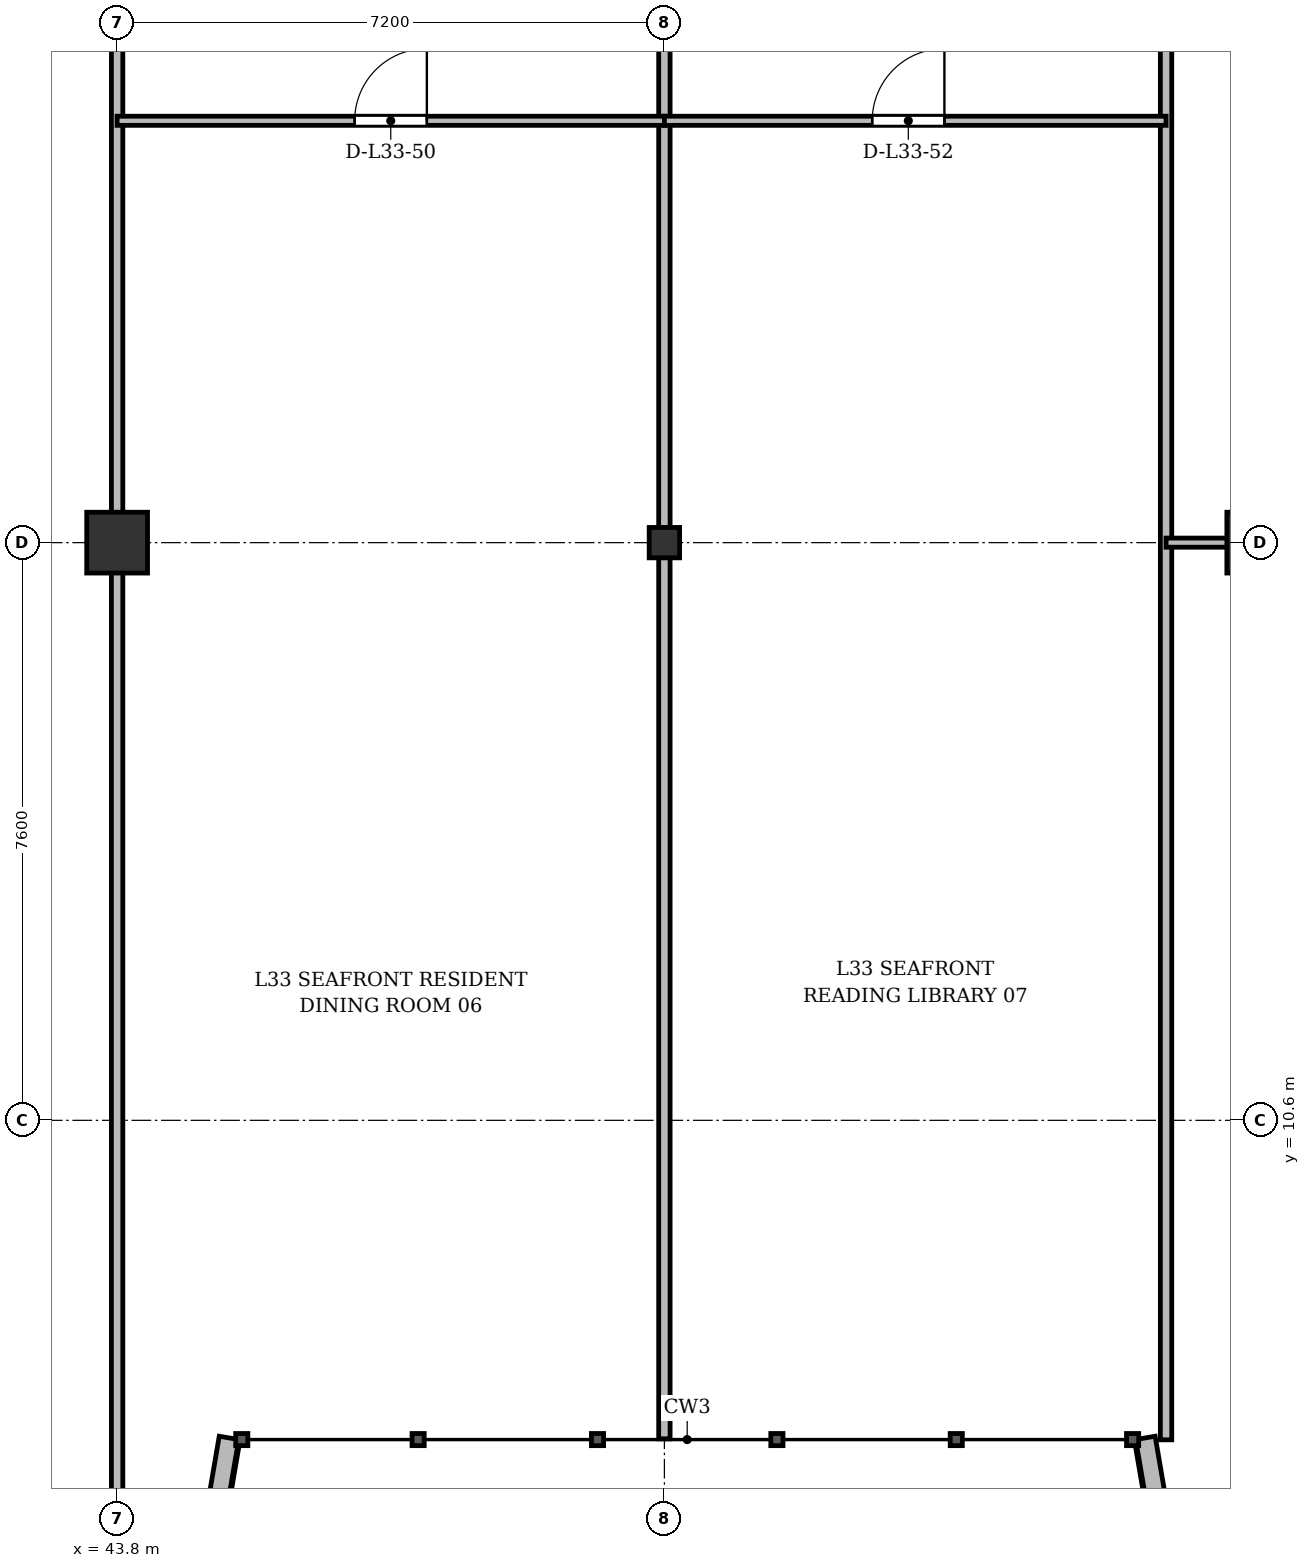
"""IFC4 building model, lengths in metres.
Left out: names, types, materials, properties, quantities, classifications, styles, units other than length and angle.
Written with IfcOpenShell. Run it as: python <this file> out.ifc"""

import sys

from ifc_helpers import new_model, si_unit, direction, frame, frame_2d, origin, origin_2d, place, context, subcontext, project, spatial, rectangle, i_section, extrude, source, transform, mapped, element, fill, save


model = new_model("IFC4")
c1 = context("Model", 3, precision=1e-05, world=origin(), true_north=direction((0.0, 1.0)))
c2 = subcontext(c1, "Body", "Model", "MODEL_VIEW")
j1 = project(units=[si_unit("LENGTHUNIT", "METRE"), si_unit("PLANEANGLEUNIT", "RADIAN")], contexts=[c1])
p1 = place(None, origin())
s1 = spatial("IfcSite", under=j1, at=p1, CompositionType="ELEMENT")
p2 = place(p1, origin())
s2 = spatial("IfcBuilding", under=s1, at=p2, CompositionType="ELEMENT")
p3 = place(p2, frame((0.0, 0.0, 128.5)))
s3 = spatial("IfcBuildingStorey", under=s2, at=p3, CompositionType="ELEMENT", Elevation=128.5)
m1 = source(origin(), c2, "Body", "SweptSolid", [
    extrude(rectangle(XDim=0.8, YDim=0.8, at=origin_2d()), origin(), (0.0, 0.0, 1.0), 3.6),
])
p4 = place(p3, frame((43.8, 18.2, 0.0), z_axis=(0.0, 0.0, 1.0), x_axis=(1.0, 0.0, 0.0)))
e1 = element("IfcColumn", 1, at=p4, inside=s3, PredefinedType="COLUMN", context=c2, shape_type="MappedRepresentation", body=[
    mapped(m1, transform((0.0, 0.0, 0.0), x_axis=(1.0, 0.0, 0.0), y_axis=(0.0, 1.0, 0.0), z_axis=(0.0, 0.0, 1.0), scale=1.0)),
])
m2 = source(origin(), c2, "Body", "SweptSolid", [
    extrude(i_section(OverallWidth=0.4, OverallDepth=0.4, WebThickness=0.022, FlangeThickness=0.035, at=origin_2d()), origin(), (0.0, 0.0, 1.0), 3.6),
])
p5 = place(p3, frame((51.0, 18.2, 0.0), z_axis=(0.0, 0.0, 1.0), x_axis=(1.0, 0.0, 0.0)))
e2 = element("IfcColumn", 2, at=p5, inside=s3, PredefinedType="COLUMN", context=c2, shape_type="MappedRepresentation", body=[
    mapped(m2, transform((0.0, 0.0, 0.0), x_axis=(1.0, 0.0, 0.0), y_axis=(0.0, 1.0, 0.0), z_axis=(0.0, 0.0, 1.0), scale=1.0)),
])
p6 = place(p3, frame((58.8, 18.2, 0.0), z_axis=(0.0, 0.0, 1.0), x_axis=(1.0, 0.0, 0.0)))
e3 = element("IfcColumn", 3, at=p6, inside=s3, PredefinedType="COLUMN", context=c2, shape_type="MappedRepresentation", body=[
    mapped(m1, transform((0.0, 0.0, 0.0), x_axis=(1.0, 0.0, 0.0), y_axis=(0.0, 1.0, 0.0), z_axis=(0.0, 0.0, 1.0), scale=1.0)),
])
for number, where, z_axis, x_axis in (
    (4, (57.928, 2.922, 0.0), (0.0, 0.0, 1.0), (-0.169, 0.986, 0.0)),
    (5, (45.272, 6.422, 0.0), (0.0, 0.0, 1.0), (-0.169, -0.986, 0.0)),
):
    element("IfcWall", number, at=place(p3, frame(where, z_axis=z_axis, x_axis=x_axis)), inside=s3, PredefinedType="SOLIDWALL", context=c2, shape_type="SweptSolid", body=[
        extrude(rectangle(XDim=3.551, YDim=0.26, at=frame_2d((1.775, 0.0))), origin(), (0.0, 0.0, 1.0), 2.632),
    ])
p7 = place(p3, frame((43.8, 3.145, 0.0), z_axis=(0.0, 0.0, 1.0), x_axis=(0.0, 1.0, 0.0)))
e6 = element("IfcWall", 6, at=p7, inside=s3, PredefinedType="PARTITIONING", context=c2, shape_type="SweptSolid", body=[
    extrude(rectangle(XDim=24.455, YDim=0.15, at=frame_2d((12.228, 0.0))), origin(), (0.0, 0.0, 1.0), 2.72),
])
p8 = place(p3, frame((51.0, 6.41, 0.0), z_axis=(0.0, 0.0, 1.0), x_axis=(0.0, 1.0, 0.0)))
e7 = element("IfcWall", 7, at=p8, inside=s3, PredefinedType="PARTITIONING", context=c2, shape_type="SweptSolid", body=[
    extrude(rectangle(XDim=21.19, YDim=0.15, at=frame_2d((10.595, 0.0))), origin(), (0.0, 0.0, 1.0), 2.72),
])
p9 = place(p3, frame((57.6, 6.397, 0.0), z_axis=(0.0, 0.0, 1.0), x_axis=(0.0, 1.0, 0.0)))
e8 = element("IfcWall", 8, at=p9, inside=s3, PredefinedType="PARTITIONING", context=c2, shape_type="SweptSolid", body=[
    extrude(rectangle(XDim=21.203, YDim=0.15, at=frame_2d((10.602, 0.0))), origin(), (0.0, 0.0, 1.0), 2.632),
])
p10 = place(p3, frame((43.8, 23.75, 0.0), z_axis=(0.0, 0.0, 1.0), x_axis=(1.0, 0.0, 0.0)))
e9 = element("IfcWall", 9, at=p10, inside=s3, PredefinedType="PARTITIONING", context=c2, shape_type="SweptSolid", body=[
    extrude(rectangle(XDim=7.2, YDim=0.12, at=frame_2d((3.6, 0.0))), origin(), (0.0, 0.0, 1.0), 2.72),
])
p11 = place(p10, frame((3.125, 0.0, 0.0)))
e10 = element("IfcOpeningElement", 10, at=p11, cuts=e9, PredefinedType="OPENING", context=c2, shape_type="SweptSolid", body=[
    extrude(rectangle(XDim=0.95, YDim=2.15, at=frame_2d((0.475, 1.075))), frame((0.0, 0.07, 0.0), z_axis=(0.0, -1.0, 0.0), x_axis=(1.0, 0.0, 0.0)), (0.0, 0.0, 1.0), 0.14),
])
p12 = place(p3, frame((51.0, 23.75, 0.0), z_axis=(0.0, 0.0, 1.0), x_axis=(1.0, 0.0, 0.0)))
e11 = element("IfcWall", 11, at=p12, inside=s3, PredefinedType="PARTITIONING", context=c2, shape_type="SweptSolid", body=[
    extrude(rectangle(XDim=6.6, YDim=0.12, at=frame_2d((3.3, 0.0))), origin(), (0.0, 0.0, 1.0), 2.72),
])
p13 = place(p12, frame((2.734, 0.0, 0.0)))
e12 = element("IfcOpeningElement", 12, at=p13, cuts=e11, PredefinedType="OPENING", context=c2, shape_type="SweptSolid", body=[
    extrude(rectangle(XDim=0.95, YDim=2.15, at=frame_2d((0.475, 1.075))), frame((0.0, 0.07, 0.0), z_axis=(0.0, -1.0, 0.0), x_axis=(1.0, 0.0, 0.0)), (0.0, 0.0, 1.0), 0.14),
])
p14 = place(p3, frame((57.6, 18.2, 0.0), z_axis=(0.0, 0.0, 1.0), x_axis=(1.0, 0.0, 0.0)))
e13 = element("IfcWall", 13, at=p14, inside=s3, PredefinedType="PARTITIONING", context=c2, shape_type="SweptSolid", body=[
    extrude(rectangle(XDim=6.6, YDim=0.12, at=frame_2d((3.3, 0.0))), origin(), (0.0, 0.0, 1.0), 2.632),
])
p15 = place(p14, frame((2.734, 0.0, 0.0)))
e14 = element("IfcOpeningElement", 14, at=p15, cuts=e13, PredefinedType="OPENING", context=c2, shape_type="SweptSolid", body=[
    extrude(rectangle(XDim=0.95, YDim=2.15, at=frame_2d((0.475, 1.075))), frame((0.0, 0.07, 0.0), z_axis=(0.0, -1.0, 0.0), x_axis=(1.0, 0.0, 0.0)), (0.0, 0.0, 1.0), 0.14),
])
m3 = source(origin(), c2, "Body", "SweptSolid", [
    extrude(rectangle(XDim=0.95, YDim=2.15, at=frame_2d((0.475, 1.075))), frame((0.0, 0.025, 0.0), z_axis=(0.0, -1.0, 0.0), x_axis=(1.0, 0.0, 0.0)), (0.0, 0.0, 1.0), 0.05),
])
p16 = place(p11, origin())
e15 = element("IfcDoor", 15, at=p16, inside=s3, OperationType="SINGLE_SWING_RIGHT", PredefinedType="DOOR", context=c2, shape_type="MappedRepresentation", body=[
    mapped(m3, transform((0.0, 0.0, 0.0), x_axis=(1.0, 0.0, 0.0), y_axis=(0.0, 1.0, 0.0), z_axis=(0.0, 0.0, 1.0), scale=1.0)),
])
fill(e10, e15)
p17 = place(p13, origin())
e16 = element("IfcDoor", 16, at=p17, inside=s3, OperationType="SINGLE_SWING_RIGHT", PredefinedType="DOOR", context=c2, shape_type="MappedRepresentation", body=[
    mapped(m3, transform((0.0, 0.0, 0.0), x_axis=(1.0, 0.0, 0.0), y_axis=(0.0, 1.0, 0.0), z_axis=(0.0, 0.0, 1.0), scale=1.0)),
])
fill(e12, e16)
save(model, sys.argv[1])
